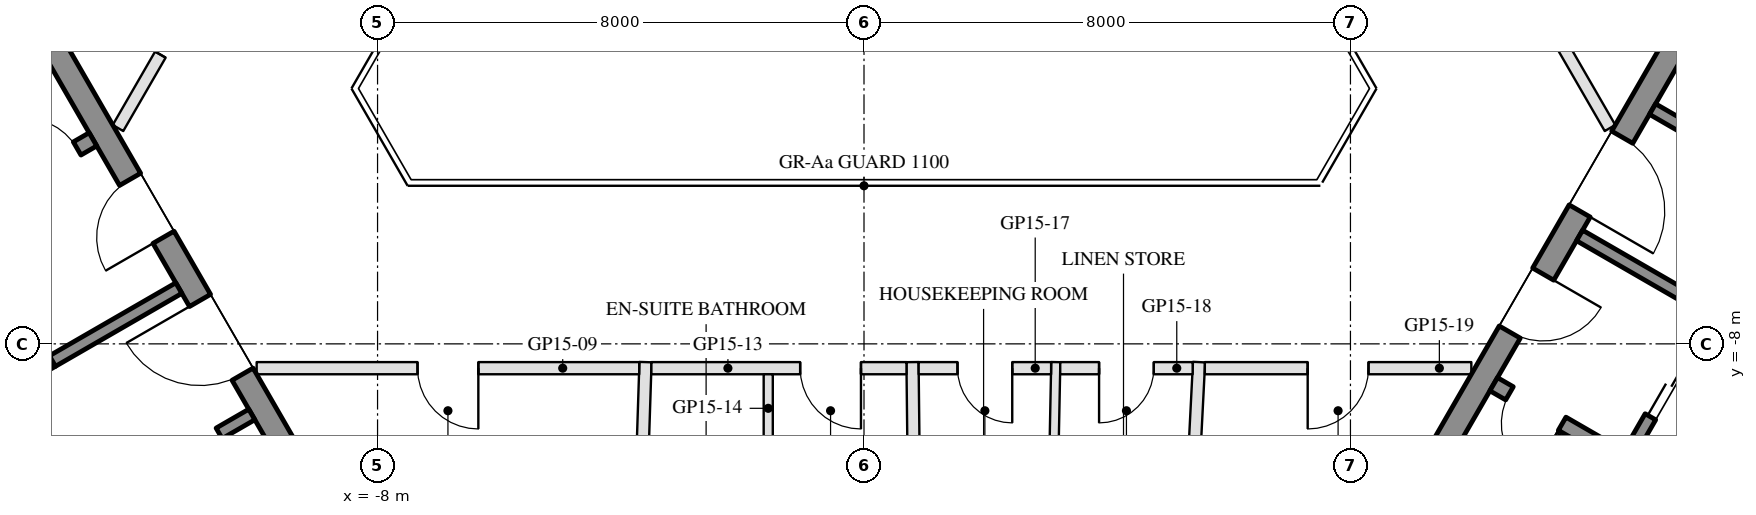
"""IFC4 building model, lengths in metres.
Left out: names, types, materials, properties, quantities, classifications, styles, units other than length and angle.
Written with IfcOpenShell. Run it as: python <this file> out.ifc"""

import sys

from ifc_helpers import new_model, si_unit, direction, frame, frame_2d, origin, place, context, subcontext, project, spatial, rectangle, extrude, element, fill, save


model = new_model("IFC4")
c1 = context("Model", 3, precision=1e-05, world=origin(), true_north=direction((0.0, 1.0)))
c2 = subcontext(c1, "Body", "Model", "MODEL_VIEW")
j1 = project(units=[si_unit("LENGTHUNIT", "METRE"), si_unit("PLANEANGLEUNIT", "RADIAN")], contexts=[c1])
p1 = place(None, origin())
s1 = spatial("IfcSite", under=j1, at=p1, CompositionType="ELEMENT")
p2 = place(p1, origin())
s2 = spatial("IfcBuilding", under=s1, at=p2, CompositionType="ELEMENT")
p3 = place(p2, frame((0.0, 0.0, 168.8)))
s3 = spatial("IfcBuildingStorey", under=s2, at=p3, CompositionType="ELEMENT", Elevation=168.8)
p4 = place(p3, frame((-13.845, -2.22, 0.0), z_axis=(0.0, 0.0, 1.0), x_axis=(0.500004234368, -0.866022959057, 0.0)))
e1 = element("IfcWall", 1, at=p4, inside=s3, PredefinedType="SHEAR", context=c2, shape_type="SweptSolid", body=[
    extrude(rectangle(XDim=10.0, YDim=0.4, at=frame_2d((5.0, 0.0))), origin(), (0.0, 0.0, 1.0), 3.5),
])
p5 = place(p4, frame((3.55, 0.0, 0.0)))
e2 = element("IfcOpeningElement", 2, at=p5, cuts=e1, PredefinedType="OPENING", context=c2, shape_type="SweptSolid", body=[
    extrude(rectangle(XDim=1.1, YDim=2.1, at=frame_2d((0.55, 1.05))), frame((0.0, 0.21, 0.0), z_axis=(0.0, -1.0, 0.0), x_axis=(1.0, 0.0, 0.0)), (0.0, 0.0, 1.0), 0.42),
])
p6 = place(p4, frame((5.85, 0.0, 0.0)))
e3 = element("IfcOpeningElement", 3, at=p6, cuts=e1, PredefinedType="OPENING", context=c2, shape_type="SweptSolid", body=[
    extrude(rectangle(XDim=1.4, YDim=2.1, at=frame_2d((0.7, 1.05))), frame((0.0, 0.21, 0.0), z_axis=(0.0, -1.0, 0.0), x_axis=(1.0, 0.0, 0.0)), (0.0, 0.0, 1.0), 0.42),
])
p7 = place(p3, frame((-12.681, -4.636, 0.0), z_axis=(0.0, 0.0, 1.0), x_axis=(-0.866021702275, -0.500006411147, 0.0)))
e4 = element("IfcWall", 4, at=p7, inside=s3, PredefinedType="SHEAR", context=c2, shape_type="SweptSolid", body=[
    extrude(rectangle(XDim=6.45, YDim=0.25, at=frame_2d((3.225, 0.0))), origin(), (0.0, 0.0, 1.0), 3.5),
])
p8 = place(p7, frame((0.3, 0.0, 0.0)))
e5 = element("IfcOpeningElement", 5, at=p8, cuts=e4, PredefinedType="OPENING", context=c2, shape_type="SweptSolid", body=[
    extrude(rectangle(XDim=1.0, YDim=2.1, at=frame_2d((0.5, 1.05))), frame((0.0, 0.135, 0.0), z_axis=(0.0, -1.0, 0.0), x_axis=(1.0, 0.0, 0.0)), (0.0, 0.0, 1.0), 0.27),
])
p9 = place(p3, frame((-14.783, -5.995, 0.0), z_axis=(0.0, 0.0, 1.0), x_axis=(0.49994636267, -0.866056369097, 0.0)))
e6 = element("IfcWall", 6, at=p9, inside=s3, PredefinedType="SHEAR", context=c2, shape_type="SweptSolid", body=[
    extrude(rectangle(XDim=2.8, YDim=0.2, at=frame_2d((1.4, 0.0))), origin(), (0.0, 0.0, 1.0), 3.5),
])
p10 = place(p9, frame((0.7, 0.0, 0.0)))
e7 = element("IfcOpeningElement", 7, at=p10, cuts=e6, PredefinedType="OPENING", context=c2, shape_type="SweptSolid", body=[
    extrude(rectangle(XDim=1.2, YDim=2.1, at=frame_2d((0.6, 1.05))), frame((0.0, 0.11, 0.0), z_axis=(0.0, -1.0, 0.0), x_axis=(1.0, 0.0, 0.0)), (0.0, 0.0, 1.0), 0.22),
])
p11 = place(p3, frame((-11.268, -7.083, 0.0), z_axis=(0.0, 0.0, 1.0), x_axis=(-0.866050077142, -0.499957262057, 0.0)))
e8 = element("IfcWall", 8, at=p11, inside=s3, PredefinedType="SHEAR", context=c2, shape_type="SweptSolid", body=[
    extrude(rectangle(XDim=2.4, YDim=0.2, at=frame_2d((1.2, 0.0))), origin(), (0.0, 0.0, 1.0), 3.5),
])
p12 = place(p3, frame((-10.068, -9.162, 0.0), z_axis=(0.0, 0.0, 1.0), x_axis=(-0.866032725843, -0.499987317609, 0.0)))
e9 = element("IfcWall", 9, at=p12, inside=s3, PredefinedType="SHEAR", context=c2, shape_type="SweptSolid", body=[
    extrude(rectangle(XDim=10.16, YDim=0.2, at=frame_2d((5.08, 0.0))), origin(), (0.0, 0.0, 1.0), 3.5),
])
p13 = place(p12, frame((0.62, 0.0, 0.0)))
e10 = element("IfcOpeningElement", 10, at=p13, cuts=e9, PredefinedType="OPENING", context=c2, shape_type="SweptSolid", body=[
    extrude(rectangle(XDim=1.1, YDim=2.1, at=frame_2d((0.55, 1.05))), frame((0.0, 0.11, 0.0), z_axis=(0.0, -1.0, 0.0), x_axis=(1.0, 0.0, 0.0)), (0.0, 0.0, 1.0), 0.22),
])
p14 = place(p12, frame((3.16, 0.0, 0.0)))
e11 = element("IfcOpeningElement", 11, at=p14, cuts=e9, PredefinedType="OPENING", context=c2, shape_type="SweptSolid", body=[
    extrude(rectangle(XDim=1.1, YDim=2.1, at=frame_2d((0.55, 1.05))), frame((0.0, 0.11, 0.0), z_axis=(0.0, -1.0, 0.0), x_axis=(1.0, 0.0, 0.0)), (0.0, 0.0, 1.0), 0.22),
])
p15 = place(p12, frame((5.7, 0.0, 0.0)))
e12 = element("IfcOpeningElement", 12, at=p15, cuts=e9, PredefinedType="OPENING", context=c2, shape_type="SweptSolid", body=[
    extrude(rectangle(XDim=1.1, YDim=2.1, at=frame_2d((0.55, 1.05))), frame((0.0, 0.11, 0.0), z_axis=(0.0, -1.0, 0.0), x_axis=(1.0, 0.0, 0.0)), (0.0, 0.0, 1.0), 0.22),
])
p16 = place(p12, frame((8.24, 0.0, 0.0)))
e13 = element("IfcOpeningElement", 13, at=p16, cuts=e9, PredefinedType="OPENING", context=c2, shape_type="SweptSolid", body=[
    extrude(rectangle(XDim=1.1, YDim=2.1, at=frame_2d((0.55, 1.05))), frame((0.0, 0.11, 0.0), z_axis=(0.0, -1.0, 0.0), x_axis=(1.0, 0.0, 0.0)), (0.0, 0.0, 1.0), 0.22),
])
p17 = place(p3, frame((8.845, -10.88, 0.0), z_axis=(0.0, 0.0, 1.0), x_axis=(0.500004234368, 0.866022959057, 0.0)))
e14 = element("IfcWall", 14, at=p17, inside=s3, PredefinedType="SHEAR", context=c2, shape_type="SweptSolid", body=[
    extrude(rectangle(XDim=10.0, YDim=0.4, at=frame_2d((5.0, 0.0))), origin(), (0.0, 0.0, 1.0), 3.5),
])
p18 = place(p17, frame((3.55, 0.0, 0.0)))
e15 = element("IfcOpeningElement", 15, at=p18, cuts=e14, PredefinedType="OPENING", context=c2, shape_type="SweptSolid", body=[
    extrude(rectangle(XDim=1.1, YDim=2.1, at=frame_2d((0.55, 1.05))), frame((0.0, 0.21, 0.0), z_axis=(0.0, -1.0, 0.0), x_axis=(1.0, 0.0, 0.0)), (0.0, 0.0, 1.0), 0.42),
])
p19 = place(p17, frame((5.85, 0.0, 0.0)))
e16 = element("IfcOpeningElement", 16, at=p19, cuts=e14, PredefinedType="OPENING", context=c2, shape_type="SweptSolid", body=[
    extrude(rectangle(XDim=1.4, YDim=2.1, at=frame_2d((0.7, 1.05))), frame((0.0, 0.21, 0.0), z_axis=(0.0, -1.0, 0.0), x_axis=(1.0, 0.0, 0.0)), (0.0, 0.0, 1.0), 0.42),
])
p20 = place(p3, frame((10.356, -8.664, 0.0), z_axis=(0.0, 0.0, 1.0), x_axis=(0.866028629588, -0.499994412703, 0.0)))
e17 = element("IfcWall", 17, at=p20, inside=s3, PredefinedType="SHEAR", context=c2, shape_type="SweptSolid", body=[
    extrude(rectangle(XDim=6.45, YDim=0.25, at=frame_2d((3.225, 0.0))), origin(), (0.0, 0.0, 1.0), 3.5),
])
p21 = place(p20, frame((0.3, 0.0, 0.0)))
e18 = element("IfcOpeningElement", 18, at=p21, cuts=e17, PredefinedType="OPENING", context=c2, shape_type="SweptSolid", body=[
    extrude(rectangle(XDim=1.0, YDim=2.1, at=frame_2d((0.5, 1.05))), frame((0.0, 0.135, 0.0), z_axis=(0.0, -1.0, 0.0), x_axis=(1.0, 0.0, 0.0)), (0.0, 0.0, 1.0), 0.27),
])
p22 = place(p3, frame((12.583, -9.805, 0.0), z_axis=(0.0, 0.0, 1.0), x_axis=(0.49994636267, 0.866056369097, 0.0)))
e19 = element("IfcWall", 19, at=p22, inside=s3, PredefinedType="SHEAR", context=c2, shape_type="SweptSolid", body=[
    extrude(rectangle(XDim=2.8, YDim=0.2, at=frame_2d((1.4, 0.0))), origin(), (0.0, 0.0, 1.0), 3.5),
])
p23 = place(p22, frame((0.7, 0.0, 0.0)))
e20 = element("IfcOpeningElement", 20, at=p23, cuts=e19, PredefinedType="OPENING", context=c2, shape_type="SweptSolid", body=[
    extrude(rectangle(XDim=1.2, YDim=2.1, at=frame_2d((0.6, 1.05))), frame((0.0, 0.11, 0.0), z_axis=(0.0, -1.0, 0.0), x_axis=(1.0, 0.0, 0.0)), (0.0, 0.0, 1.0), 0.22),
])
p24 = place(p3, frame((11.768, -6.217, 0.0), z_axis=(0.0, 0.0, 1.0), x_axis=(0.866050077142, -0.499957262057, 0.0)))
e21 = element("IfcWall", 21, at=p24, inside=s3, PredefinedType="SHEAR", context=c2, shape_type="SweptSolid", body=[
    extrude(rectangle(XDim=2.4, YDim=0.2, at=frame_2d((1.2, 0.0))), origin(), (0.0, 0.0, 1.0), 3.5),
])
p25 = place(p3, frame((12.968, -4.138, 0.0), z_axis=(0.0, 0.0, 1.0), x_axis=(0.866028328073, -0.49999493495, 0.0)))
e22 = element("IfcWall", 22, at=p25, inside=s3, PredefinedType="SHEAR", context=c2, shape_type="SweptSolid", body=[
    extrude(rectangle(XDim=10.16, YDim=0.2, at=frame_2d((5.08, 0.0))), origin(), (0.0, 0.0, 1.0), 3.5),
])
p26 = place(p25, frame((3.26, 0.0, 0.0)))
e23 = element("IfcOpeningElement", 23, at=p26, cuts=e22, PredefinedType="OPENING", context=c2, shape_type="SweptSolid", body=[
    extrude(rectangle(XDim=0.9, YDim=2.1, at=frame_2d((0.45, 1.05))), frame((0.0, 0.11, 0.0), z_axis=(0.0, -1.0, 0.0), x_axis=(1.0, 0.0, 0.0)), (0.0, 0.0, 1.0), 0.22),
])
p27 = place(p25, frame((8.34, 0.0, 0.0)))
e24 = element("IfcOpeningElement", 24, at=p27, cuts=e22, PredefinedType="OPENING", context=c2, shape_type="SweptSolid", body=[
    extrude(rectangle(XDim=0.9, YDim=2.1, at=frame_2d((0.45, 1.05))), frame((0.0, 0.11, 0.0), z_axis=(0.0, -1.0, 0.0), x_axis=(1.0, 0.0, 0.0)), (0.0, 0.0, 1.0), 0.22),
])
p28 = place(p3, frame((-3.921, -18.38, 0.0), z_axis=(0.0, 0.0, 1.0), x_axis=(0.032462838588, 0.999472943161, 0.0)))
e25 = element("IfcWall", 25, at=p28, inside=s3, PredefinedType="PARTITIONING", context=c2, shape_type="SweptSolid", body=[
    extrude(rectangle(XDim=10.085, YDim=0.2, at=frame_2d((5.042, 0.0))), origin(), (0.0, 0.0, 1.0), 2.95),
])
p29 = place(p3, frame((0.92, -19.28, 0.0), z_axis=(0.0, 0.0, 1.0), x_axis=(-0.011116847578, 0.999938205941, 0.0)))
e26 = element("IfcWall", 26, at=p29, inside=s3, PredefinedType="PARTITIONING", context=c2, shape_type="SweptSolid", body=[
    extrude(rectangle(XDim=10.981, YDim=0.2, at=frame_2d((5.49, 0.0))), origin(), (0.0, 0.0, 1.0), 3.06),
])
p30 = place(p3, frame((4.95, -19.28, 0.0), z_axis=(0.0, 0.0, 1.0), x_axis=(0.050963172582, 0.998700533213, 0.0)))
e27 = element("IfcWall", 27, at=p30, inside=s3, PredefinedType="PARTITIONING", context=c2, shape_type="SweptSolid", body=[
    extrude(rectangle(XDim=10.994, YDim=0.2, at=frame_2d((5.497, 0.0))), origin(), (0.0, 0.0, 1.0), 3.06),
])
p31 = place(p3, frame((-3.697, -8.4, 0.0), z_axis=(0.0, 0.0, 1.0), x_axis=(-1.0, 0.0, 0.0)))
e28 = element("IfcWall", 28, at=p31, inside=s3, PredefinedType="PARTITIONING", context=c2, shape_type="SweptSolid", body=[
    extrude(rectangle(XDim=6.292, YDim=0.2, at=frame_2d((3.146, 0.0))), origin(), (0.0, 0.0, 1.0), 2.95),
])
p32 = place(p31, frame((2.646, 0.0, 0.0)))
e29 = element("IfcOpeningElement", 29, at=p32, cuts=e28, PredefinedType="OPENING", context=c2, shape_type="SweptSolid", body=[
    extrude(rectangle(XDim=1.0, YDim=2.1, at=frame_2d((0.5, 1.05))), frame((0.0, 0.11, 0.0), z_axis=(0.0, -1.0, 0.0), x_axis=(1.0, 0.0, 0.0)), (0.0, 0.0, 1.0), 0.22),
])
p33 = place(p3, frame((0.699, -8.4, 0.0), z_axis=(0.0, 0.0, 1.0), x_axis=(-1.0, 0.0, 0.0)))
e30 = element("IfcWall", 30, at=p33, inside=s3, PredefinedType="PARTITIONING", context=c2, shape_type="SweptSolid", body=[
    extrude(rectangle(XDim=4.196, YDim=0.2, at=frame_2d((2.098, 0.0))), origin(), (0.0, 0.0, 1.0), 2.95),
])
p34 = place(p33, frame((0.749, 0.0, 0.0)))
e31 = element("IfcOpeningElement", 31, at=p34, cuts=e30, PredefinedType="OPENING", context=c2, shape_type="SweptSolid", body=[
    extrude(rectangle(XDim=1.0, YDim=2.1, at=frame_2d((0.5, 1.05))), frame((0.0, 0.11, 0.0), z_axis=(0.0, -1.0, 0.0), x_axis=(1.0, 0.0, 0.0)), (0.0, 0.0, 1.0), 0.22),
])
p35 = place(p3, frame((-1.575, -11.3, 0.0), z_axis=(0.0, 0.0, 1.0), x_axis=(0.0, 1.0, 0.0)))
e32 = element("IfcWall", 32, at=p35, inside=s3, PredefinedType="PARTITIONING", context=c2, shape_type="SweptSolid", body=[
    extrude(rectangle(XDim=2.8, YDim=0.15, at=frame_2d((1.4, 0.0))), origin(), (0.0, 0.0, 1.0), 3.55),
])
p36 = place(p35, frame((0.5, 0.0, 0.0)))
e33 = element("IfcOpeningElement", 33, at=p36, cuts=e32, PredefinedType="OPENING", context=c2, shape_type="SweptSolid", body=[
    extrude(rectangle(XDim=0.9, YDim=2.1, at=frame_2d((0.45, 1.05))), frame((0.0, 0.085, 0.0), z_axis=(0.0, -1.0, 0.0), x_axis=(1.0, 0.0, 0.0)), (0.0, 0.0, 1.0), 0.17),
])
p37 = place(p3, frame((2.935, -19.28, 0.0), z_axis=(0.0, 0.0, 1.0), x_axis=(0.019940891206, 0.99980116066, 0.0)))
e34 = element("IfcWall", 34, at=p37, inside=s3, PredefinedType="PARTITIONING", context=c2, shape_type="SweptSolid", body=[
    extrude(rectangle(XDim=10.982, YDim=0.15, at=frame_2d((5.491, 0.0))), origin(), (0.0, 0.0, 1.0), 3.06),
])
p38 = place(p3, frame((3.077, -8.4, 0.0), z_axis=(0.0, 0.0, 1.0), x_axis=(-1.0, 0.0, 0.0)))
e35 = element("IfcWall", 35, at=p38, inside=s3, PredefinedType="PARTITIONING", context=c2, shape_type="SweptSolid", body=[
    extrude(rectangle(XDim=2.178, YDim=0.2, at=frame_2d((1.089, 0.0))), origin(), (0.0, 0.0, 1.0), 3.55),
])
p39 = place(p38, frame((0.639, 0.0, 0.0)))
e36 = element("IfcOpeningElement", 36, at=p39, cuts=e35, PredefinedType="OPENING", context=c2, shape_type="SweptSolid", body=[
    extrude(rectangle(XDim=0.9, YDim=2.1, at=frame_2d((0.45, 1.05))), frame((0.0, 0.11, 0.0), z_axis=(0.0, -1.0, 0.0), x_axis=(1.0, 0.0, 0.0)), (0.0, 0.0, 1.0), 0.22),
])
p40 = place(p3, frame((5.405, -8.4, 0.0), z_axis=(0.0, 0.0, 1.0), x_axis=(-1.0, 0.0, 0.0)))
e37 = element("IfcWall", 37, at=p40, inside=s3, PredefinedType="PARTITIONING", context=c2, shape_type="SweptSolid", body=[
    extrude(rectangle(XDim=2.178, YDim=0.2, at=frame_2d((1.089, 0.0))), origin(), (0.0, 0.0, 1.0), 2.95),
])
p41 = place(p40, frame((0.639, 0.0, 0.0)))
e38 = element("IfcOpeningElement", 38, at=p41, cuts=e37, PredefinedType="OPENING", context=c2, shape_type="SweptSolid", body=[
    extrude(rectangle(XDim=0.9, YDim=2.1, at=frame_2d((0.45, 1.05))), frame((0.0, 0.11, 0.0), z_axis=(0.0, -1.0, 0.0), x_axis=(1.0, 0.0, 0.0)), (0.0, 0.0, 1.0), 0.22),
])
p42 = place(p3, frame((9.988, -8.4, 0.0), z_axis=(0.0, 0.0, 1.0), x_axis=(-1.0, 0.0, 0.0)))
e39 = element("IfcWall", 39, at=p42, inside=s3, PredefinedType="PARTITIONING", context=c2, shape_type="SweptSolid", body=[
    extrude(rectangle(XDim=4.383, YDim=0.2, at=frame_2d((2.191, 0.0))), origin(), (0.0, 0.0, 1.0), 2.95),
])
p43 = place(p42, frame((1.691, 0.0, 0.0)))
e40 = element("IfcOpeningElement", 40, at=p43, cuts=e39, PredefinedType="OPENING", context=c2, shape_type="SweptSolid", body=[
    extrude(rectangle(XDim=1.0, YDim=2.1, at=frame_2d((0.5, 1.05))), frame((0.0, 0.11, 0.0), z_axis=(0.0, -1.0, 0.0), x_axis=(1.0, 0.0, 0.0)), (0.0, 0.0, 1.0), 0.22),
])
p44 = place(p3, frame((9.931, -0.401, 0.0), z_axis=(0.0, 0.0, 1.0), x_axis=(0.5000418389, -0.866001246737, 0.0)))
e41 = element("IfcWall", 41, at=p44, inside=s3, PredefinedType="PARTITIONING", context=c2, shape_type="SweptSolid", body=[
    extrude(rectangle(XDim=4.676, YDim=0.2, at=frame_2d((2.338, 0.0))), origin(), (0.0, 0.0, 1.0), 2.95),
])
p45 = place(p44, frame((1.838, 0.0, 0.0)))
e42 = element("IfcOpeningElement", 42, at=p45, cuts=e41, PredefinedType="OPENING", context=c2, shape_type="SweptSolid", body=[
    extrude(rectangle(XDim=1.0, YDim=2.1, at=frame_2d((0.5, 1.05))), frame((0.0, 0.11, 0.0), z_axis=(0.0, -1.0, 0.0), x_axis=(1.0, 0.0, 0.0)), (0.0, 0.0, 1.0), 0.22),
])
p46 = place(p3, frame((-12.269, -4.45, 0.0), z_axis=(0.0, 0.0, 1.0), x_axis=(0.500055316652, 0.865993464345, 0.0)))
e43 = element("IfcWall", 43, at=p46, inside=s3, PredefinedType="PARTITIONING", context=c2, shape_type="SweptSolid", body=[
    extrude(rectangle(XDim=3.788, YDim=0.2, at=frame_2d((1.894, 0.0))), origin(), (0.0, 0.0, 1.0), 2.95),
])
p47 = place(p46, frame((1.394, 0.0, 0.0)))
e44 = element("IfcOpeningElement", 44, at=p47, cuts=e43, PredefinedType="OPENING", context=c2, shape_type="SweptSolid", body=[
    extrude(rectangle(XDim=1.0, YDim=2.1, at=frame_2d((0.5, 1.05))), frame((0.0, 0.11, 0.0), z_axis=(0.0, -1.0, 0.0), x_axis=(1.0, 0.0, 0.0)), (0.0, 0.0, 1.0), 0.22),
])
p48 = place(p13, origin())
e45 = element("IfcDoor", 45, at=p48, inside=s3, OperationType="DOUBLE_DOOR_SLIDING", PredefinedType="DOOR", context=c2, shape_type="SweptSolid", body=[
    extrude(rectangle(XDim=1.1, YDim=2.1, at=frame_2d((0.55, 1.05))), frame((0.0, 0.025, 0.0), z_axis=(0.0, -1.0, 0.0), x_axis=(1.0, 0.0, 0.0)), (0.0, 0.0, 1.0), 0.05),
])
fill(e10, e45)
p49 = place(p5, frame((1.1, 0.0, 0.0), z_axis=(0.0, 0.0, 1.0), x_axis=(-1.0, 0.0, 0.0)))
e46 = element("IfcDoor", 46, at=p49, inside=s3, OperationType="SINGLE_SWING_LEFT", PredefinedType="DOOR", context=c2, shape_type="SweptSolid", body=[
    extrude(rectangle(XDim=1.1, YDim=2.1, at=frame_2d((0.55, 1.05))), frame((0.0, 0.025, 0.0), z_axis=(0.0, -1.0, 0.0), x_axis=(1.0, 0.0, 0.0)), (0.0, 0.0, 1.0), 0.05),
])
fill(e2, e46)
p50 = place(p6, frame((1.4, 0.0, 0.0), z_axis=(0.0, 0.0, 1.0), x_axis=(-1.0, 0.0, 0.0)))
e47 = element("IfcDoor", 47, at=p50, inside=s3, OperationType="DOUBLE_DOOR_SINGLE_SWING", PredefinedType="DOOR", context=c2, shape_type="SweptSolid", body=[
    extrude(rectangle(XDim=1.4, YDim=2.1, at=frame_2d((0.7, 1.05))), frame((0.0, 0.025, 0.0), z_axis=(0.0, -1.0, 0.0), x_axis=(1.0, 0.0, 0.0)), (0.0, 0.0, 1.0), 0.05),
])
fill(e3, e47)
p51 = place(p8, frame((1.0, 0.0, 0.0), z_axis=(0.0, 0.0, 1.0), x_axis=(-1.0, 0.0, 0.0)))
e48 = element("IfcDoor", 48, at=p51, inside=s3, OperationType="SINGLE_SWING_LEFT", PredefinedType="DOOR", context=c2, shape_type="SweptSolid", body=[
    extrude(rectangle(XDim=1.0, YDim=2.1, at=frame_2d((0.5, 1.05))), frame((0.0, 0.025, 0.0), z_axis=(0.0, -1.0, 0.0), x_axis=(1.0, 0.0, 0.0)), (0.0, 0.0, 1.0), 0.05),
])
fill(e5, e48)
p52 = place(p23, origin())
e49 = element("IfcDoor", 49, at=p52, inside=s3, OperationType="DOUBLE_DOOR_SLIDING", PredefinedType="DOOR", context=c2, shape_type="SweptSolid", body=[
    extrude(rectangle(XDim=1.2, YDim=2.1, at=frame_2d((0.6, 1.05))), frame((0.0, 0.025, 0.0), z_axis=(0.0, -1.0, 0.0), x_axis=(1.0, 0.0, 0.0)), (0.0, 0.0, 1.0), 0.05),
])
fill(e20, e49)
p53 = place(p18, frame((1.1, 0.0, 0.0), z_axis=(0.0, 0.0, 1.0), x_axis=(-1.0, 0.0, 0.0)))
e50 = element("IfcDoor", 50, at=p53, inside=s3, OperationType="SINGLE_SWING_LEFT", PredefinedType="DOOR", context=c2, shape_type="SweptSolid", body=[
    extrude(rectangle(XDim=1.1, YDim=2.1, at=frame_2d((0.55, 1.05))), frame((0.0, 0.025, 0.0), z_axis=(0.0, -1.0, 0.0), x_axis=(1.0, 0.0, 0.0)), (0.0, 0.0, 1.0), 0.05),
])
fill(e15, e50)
p54 = place(p19, frame((1.4, 0.0, 0.0), z_axis=(0.0, 0.0, 1.0), x_axis=(-1.0, 0.0, 0.0)))
e51 = element("IfcDoor", 51, at=p54, inside=s3, OperationType="DOUBLE_DOOR_SINGLE_SWING", PredefinedType="DOOR", context=c2, shape_type="SweptSolid", body=[
    extrude(rectangle(XDim=1.4, YDim=2.1, at=frame_2d((0.7, 1.05))), frame((0.0, 0.025, 0.0), z_axis=(0.0, -1.0, 0.0), x_axis=(1.0, 0.0, 0.0)), (0.0, 0.0, 1.0), 0.05),
])
fill(e16, e51)
p55 = place(p21, frame((1.0, 0.0, 0.0), z_axis=(0.0, 0.0, 1.0), x_axis=(-1.0, 0.0, 0.0)))
e52 = element("IfcDoor", 52, at=p55, inside=s3, OperationType="SINGLE_SWING_LEFT", PredefinedType="DOOR", context=c2, shape_type="SweptSolid", body=[
    extrude(rectangle(XDim=1.0, YDim=2.1, at=frame_2d((0.5, 1.05))), frame((0.0, 0.025, 0.0), z_axis=(0.0, -1.0, 0.0), x_axis=(1.0, 0.0, 0.0)), (0.0, 0.0, 1.0), 0.05),
])
fill(e18, e52)
p56 = place(p32, origin())
e53 = element("IfcDoor", 53, at=p56, inside=s3, OperationType="SINGLE_SWING_LEFT", PredefinedType="DOOR", context=c2, shape_type="SweptSolid", body=[
    extrude(rectangle(XDim=1.0, YDim=2.1, at=frame_2d((0.5, 1.05))), frame((0.0, 0.025, 0.0), z_axis=(0.0, -1.0, 0.0), x_axis=(1.0, 0.0, 0.0)), (0.0, 0.0, 1.0), 0.05),
])
fill(e29, e53)
p57 = place(p34, origin())
e54 = element("IfcDoor", 54, at=p57, inside=s3, OperationType="SINGLE_SWING_LEFT", PredefinedType="DOOR", context=c2, shape_type="SweptSolid", body=[
    extrude(rectangle(XDim=1.0, YDim=2.1, at=frame_2d((0.5, 1.05))), frame((0.0, 0.025, 0.0), z_axis=(0.0, -1.0, 0.0), x_axis=(1.0, 0.0, 0.0)), (0.0, 0.0, 1.0), 0.05),
])
fill(e31, e54)
p58 = place(p39, origin())
e55 = element("IfcDoor", 55, at=p58, inside=s3, OperationType="SINGLE_SWING_LEFT", PredefinedType="DOOR", context=c2, shape_type="SweptSolid", body=[
    extrude(rectangle(XDim=0.9, YDim=2.1, at=frame_2d((0.45, 1.05))), frame((0.0, 0.025, 0.0), z_axis=(0.0, -1.0, 0.0), x_axis=(1.0, 0.0, 0.0)), (0.0, 0.0, 1.0), 0.05),
])
fill(e36, e55)
p59 = place(p41, origin())
e56 = element("IfcDoor", 56, at=p59, inside=s3, OperationType="SINGLE_SWING_RIGHT", PredefinedType="DOOR", context=c2, shape_type="SweptSolid", body=[
    extrude(rectangle(XDim=0.9, YDim=2.1, at=frame_2d((0.45, 1.05))), frame((0.0, 0.025, 0.0), z_axis=(0.0, -1.0, 0.0), x_axis=(1.0, 0.0, 0.0)), (0.0, 0.0, 1.0), 0.05),
])
fill(e38, e56)
p60 = place(p43, origin())
e57 = element("IfcDoor", 57, at=p60, inside=s3, OperationType="SINGLE_SWING_RIGHT", PredefinedType="DOOR", context=c2, shape_type="SweptSolid", body=[
    extrude(rectangle(XDim=1.0, YDim=2.1, at=frame_2d((0.5, 1.05))), frame((0.0, 0.025, 0.0), z_axis=(0.0, -1.0, 0.0), x_axis=(1.0, 0.0, 0.0)), (0.0, 0.0, 1.0), 0.05),
])
fill(e40, e57)
p61 = place(p47, origin())
e58 = element("IfcDoor", 58, at=p61, inside=s3, OperationType="SINGLE_SWING_RIGHT", PredefinedType="DOOR", context=c2, shape_type="SweptSolid", body=[
    extrude(rectangle(XDim=1.0, YDim=2.1, at=frame_2d((0.5, 1.05))), frame((0.0, 0.025, 0.0), z_axis=(0.0, -1.0, 0.0), x_axis=(1.0, 0.0, 0.0)), (0.0, 0.0, 1.0), 0.05),
])
fill(e44, e58)
save(model, sys.argv[1])
